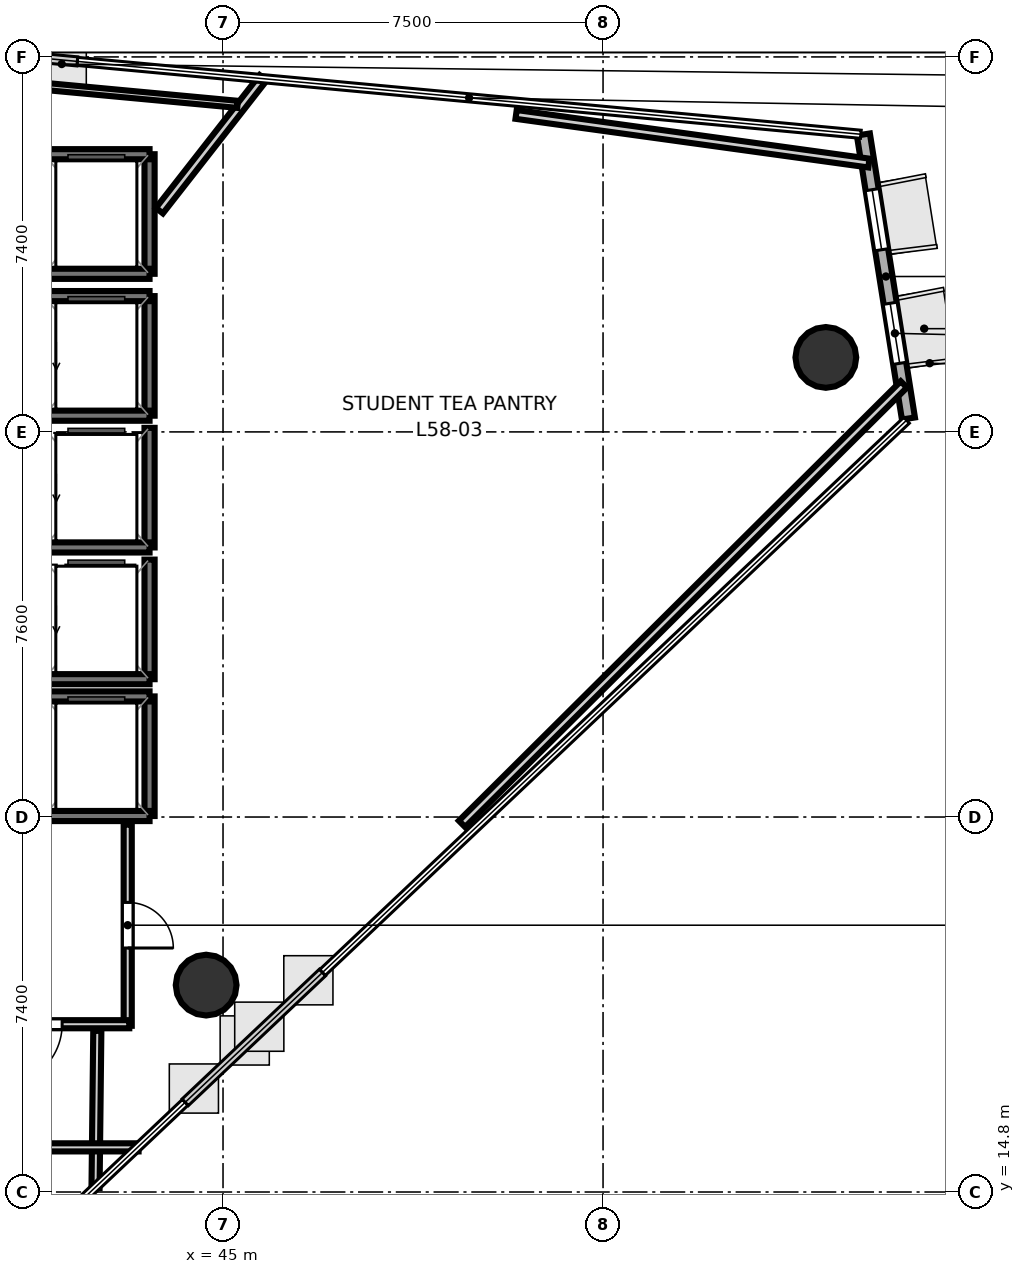
"""IFC4 building model, lengths in metres.
Left out: names, types, materials, properties, quantities, classifications, styles, units other than length and angle.
Written with IfcOpenShell. Run it as: python <this file> out.ifc"""

import sys

from ifc_helpers import new_model, si_unit, direction, frame, frame_2d, origin, origin_2d, place, context, subcontext, project, spatial, rectangle, hollow_circle, extrude, element, fill, save


model = new_model("IFC4")
c1 = context("Model", 3, precision=1e-05, world=origin(), true_north=direction((0.0, 1.0)))
c2 = subcontext(c1, "Body", "Model", "MODEL_VIEW")
j1 = project(units=[si_unit("LENGTHUNIT", "METRE"), si_unit("PLANEANGLEUNIT", "RADIAN")], contexts=[c1])
p1 = place(None, origin())
s1 = spatial("IfcSite", under=j1, at=p1, CompositionType="ELEMENT")
p2 = place(p1, origin())
s2 = spatial("IfcBuilding", under=s1, at=p2, CompositionType="ELEMENT")
p3 = place(p2, frame((0.0, 0.0, 226.2)))
s3 = spatial("IfcBuildingStorey", under=s2, at=p3, CompositionType="ELEMENT", Elevation=226.2)
for number, where, z_axis, x_axis in (
    (1, (56.897, 31.27, 0.0), (0.0, 0.0, 1.0), (1.0, 0.0, 0.0)),
    (2, (44.667, 18.883, 0.0), (0.0, 0.0, 1.0), (1.0, 0.0, 0.0)),
):
    element("IfcColumn", number, at=place(p3, frame(where, z_axis=z_axis, x_axis=x_axis)), inside=s3, PredefinedType="COLUMN", context=c2, shape_type="SweptSolid", body=[
        extrude(hollow_circle(Radius=0.6, WallThickness=0.03, at=origin_2d()), origin(), (0.0, 0.0, 1.0), 3.7),
    ])
p4 = place(p3, frame((58.527, 30.064, 0.0), z_axis=(0.0, 0.0, 1.0), x_axis=(-0.156726912171, 0.987641977136, 0.0)))
e3 = element("IfcWall", 3, at=p4, inside=s3, PredefinedType="SOLIDWALL", context=c2, shape_type="SweptSolid", body=[
    extrude(rectangle(XDim=5.675, YDim=0.26, at=frame_2d((2.837, 0.0))), origin(), (0.0, 0.0, 1.0), 3.4),
])
p5 = place(p4, frame((1.102, 0.0, 0.9)))
e4 = element("IfcOpeningElement", 4, at=p5, cuts=e3, PredefinedType="OPENING", context=c2, shape_type="SweptSolid", body=[
    extrude(rectangle(XDim=1.2, YDim=2.0, at=frame_2d((0.6, 1.0))), frame((0.0, 0.14, 0.0), z_axis=(0.0, -1.0, 0.0), x_axis=(1.0, 0.0, 0.0)), (0.0, 0.0, 1.0), 0.28),
])
p6 = place(p4, frame((3.372, 0.0, 0.9)))
e5 = element("IfcOpeningElement", 5, at=p6, cuts=e3, PredefinedType="OPENING", context=c2, shape_type="SweptSolid", body=[
    extrude(rectangle(XDim=1.2, YDim=2.0, at=frame_2d((0.6, 1.0))), frame((0.0, 0.14, 0.0), z_axis=(0.0, -1.0, 0.0), x_axis=(1.0, 0.0, 0.0)), (0.0, 0.0, 1.0), 0.28),
])
p7 = place(p3, frame((43.55, 30.12, 0.0), z_axis=(0.0, 0.0, 1.0), x_axis=(0.0, 1.0, 0.0)))
e6 = element("IfcWall", 6, at=p7, inside=s3, PredefinedType="SOLIDWALL", context=c2, shape_type="SweptSolid", body=[
    extrude(rectangle(XDim=2.36, YDim=0.2, at=frame_2d((1.18, 0.0))), origin(), (0.0, 0.0, 1.0), 3.4),
])
for number, where, z_axis, x_axis in (
    (7, (41.45, 32.48, 0.0), (0.0, 0.0, 1.0), (1.0, 0.0, 0.0)),
    (8, (41.45, 30.12, 0.0), (0.0, 0.0, 1.0), (1.0, 0.0, 0.0)),
):
    element("IfcWall", number, at=place(p3, frame(where, z_axis=z_axis, x_axis=x_axis)), inside=s3, PredefinedType="SOLIDWALL", context=c2, shape_type="SweptSolid", body=[
        extrude(rectangle(XDim=2.1, YDim=0.2, at=frame_2d((1.05, 0.0))), origin(), (0.0, 0.0, 1.0), 3.4),
    ])
p8 = place(p3, frame((43.55, 27.52, 0.0), z_axis=(0.0, 0.0, 1.0), x_axis=(0.0, 1.0, 0.0)))
e9 = element("IfcWall", 9, at=p8, inside=s3, PredefinedType="SOLIDWALL", context=c2, shape_type="SweptSolid", body=[
    extrude(rectangle(XDim=2.36, YDim=0.2, at=frame_2d((1.18, 0.0))), origin(), (0.0, 0.0, 1.0), 3.4),
])
p9 = place(p3, frame((41.45, 27.52, 0.0), z_axis=(0.0, 0.0, 1.0), x_axis=(1.0, 0.0, 0.0)))
e10 = element("IfcWall", 10, at=p9, inside=s3, PredefinedType="SOLIDWALL", context=c2, shape_type="SweptSolid", body=[
    extrude(rectangle(XDim=2.1, YDim=0.2, at=frame_2d((1.05, 0.0))), origin(), (0.0, 0.0, 1.0), 3.4),
])
p10 = place(p3, frame((43.55, 24.92, 0.0), z_axis=(0.0, 0.0, 1.0), x_axis=(0.0, 1.0, 0.0)))
e11 = element("IfcWall", 11, at=p10, inside=s3, PredefinedType="SOLIDWALL", context=c2, shape_type="SweptSolid", body=[
    extrude(rectangle(XDim=2.36, YDim=0.2, at=frame_2d((1.18, 0.0))), origin(), (0.0, 0.0, 1.0), 3.4),
])
p11 = place(p3, frame((41.45, 24.92, 0.0), z_axis=(0.0, 0.0, 1.0), x_axis=(1.0, 0.0, 0.0)))
e12 = element("IfcWall", 12, at=p11, inside=s3, PredefinedType="SOLIDWALL", context=c2, shape_type="SweptSolid", body=[
    extrude(rectangle(XDim=2.1, YDim=0.2, at=frame_2d((1.05, 0.0))), origin(), (0.0, 0.0, 1.0), 3.4),
])
p12 = place(p3, frame((43.55, 22.22, 0.0), z_axis=(0.0, 0.0, 1.0), x_axis=(0.0, 1.0, 0.0)))
e13 = element("IfcWall", 13, at=p12, inside=s3, PredefinedType="SOLIDWALL", context=c2, shape_type="SweptSolid", body=[
    extrude(rectangle(XDim=2.36, YDim=0.2, at=frame_2d((1.18, 0.0))), origin(), (0.0, 0.0, 1.0), 3.4),
])
for number, where, z_axis, x_axis in (
    (14, (41.45, 24.58, 0.0), (0.0, 0.0, 1.0), (1.0, 0.0, 0.0)),
    (15, (41.45, 22.22, 0.0), (0.0, 0.0, 1.0), (1.0, 0.0, 0.0)),
):
    element("IfcWall", number, at=place(p3, frame(where, z_axis=z_axis, x_axis=x_axis)), inside=s3, PredefinedType="SOLIDWALL", context=c2, shape_type="SweptSolid", body=[
        extrude(rectangle(XDim=2.1, YDim=0.2, at=frame_2d((1.05, 0.0))), origin(), (0.0, 0.0, 1.0), 3.4),
    ])
p13 = place(p3, frame((43.55, 32.92, 0.0), z_axis=(0.0, 0.0, 1.0), x_axis=(0.0, 1.0, 0.0)))
e16 = element("IfcWall", 16, at=p13, inside=s3, PredefinedType="SOLIDWALL", context=c2, shape_type="SweptSolid", body=[
    extrude(rectangle(XDim=2.36, YDim=0.2, at=frame_2d((1.18, 0.0))), origin(), (0.0, 0.0, 1.0), 3.4),
])
for number, where, z_axis, x_axis in (
    (17, (41.45, 35.28, 0.0), (0.0, 0.0, 1.0), (1.0, 0.0, 0.0)),
    (18, (41.45, 32.92, 0.0), (0.0, 0.0, 1.0), (1.0, 0.0, 0.0)),
):
    element("IfcWall", number, at=place(p3, frame(where, z_axis=z_axis, x_axis=x_axis)), inside=s3, PredefinedType="SOLIDWALL", context=c2, shape_type="SweptSolid", body=[
        extrude(rectangle(XDim=2.1, YDim=0.2, at=frame_2d((1.05, 0.0))), origin(), (0.0, 0.0, 1.0), 3.4),
    ])
p14 = place(p3, frame((43.119, 22.05, 0.0), z_axis=(0.0, 0.0, 1.0), x_axis=(0.0, -1.0, 0.0)))
e19 = element("IfcWall", 19, at=p14, inside=s3, PredefinedType="PARTITIONING", context=c2, shape_type="SweptSolid", body=[
    extrude(rectangle(XDim=3.97, YDim=0.16, at=frame_2d((1.985, 0.0))), origin(), (0.0, 0.0, 1.0), 2.72),
])
p15 = place(p14, frame((1.535, 0.0, 0.0)))
e20 = element("IfcOpeningElement", 20, at=p15, cuts=e19, PredefinedType="OPENING", context=c2, shape_type="SweptSolid", body=[
    extrude(rectangle(XDim=0.9, YDim=2.1, at=frame_2d((0.45, 1.05))), frame((0.0, 0.09, 0.0), z_axis=(0.0, -1.0, 0.0), x_axis=(1.0, 0.0, 0.0)), (0.0, 0.0, 1.0), 0.18),
])
p16 = place(p3, frame((43.15, 18.111, 0.0), z_axis=(0.0, 0.0, 1.0), x_axis=(-1.0, 0.0, 0.0)))
e21 = element("IfcWall", 21, at=p16, inside=s3, PredefinedType="PARTITIONING", context=c2, shape_type="SweptSolid", body=[
    extrude(rectangle(XDim=2.73, YDim=0.16, at=frame_2d((1.365, 0.0))), origin(), (0.0, 0.0, 1.0), 2.72),
])
p17 = place(p16, frame((1.325, 0.0, 0.0)))
e22 = element("IfcOpeningElement", 22, at=p17, cuts=e21, PredefinedType="OPENING", context=c2, shape_type="SweptSolid", body=[
    extrude(rectangle(XDim=1.2, YDim=2.15, at=frame_2d((0.6, 1.075))), frame((0.0, 0.09, 0.0), z_axis=(0.0, -1.0, 0.0), x_axis=(1.0, 0.0, 0.0)), (0.0, 0.0, 1.0), 0.18),
])
p18 = place(p3, frame((42.519, 17.98, 0.0), z_axis=(0.0, 0.0, 1.0), x_axis=(-0.011327152438, -0.999935845751, 0.0)))
e23 = element("IfcWall", 23, at=p18, inside=s3, PredefinedType="PARTITIONING", context=c2, shape_type="SweptSolid", body=[
    extrude(rectangle(XDim=3.104, YDim=0.16, at=frame_2d((1.552, 0.0))), origin(), (0.0, 0.0, 1.0), 2.72),
])
p19 = place(p3, frame((43.333, 15.681, 0.0), z_axis=(0.0, 0.0, 1.0), x_axis=(-1.0, 0.0, 0.0)))
e24 = element("IfcWall", 24, at=p19, inside=s3, PredefinedType="PARTITIONING", context=c2, shape_type="SweptSolid", body=[
    extrude(rectangle(XDim=14.933, YDim=0.16, at=frame_2d((7.467, 0.0))), origin(), (0.0, 0.0, 1.0), 2.72),
])
p20 = place(p19, frame((10.693, 0.0, 0.0)))
e25 = element("IfcOpeningElement", 25, at=p20, cuts=e24, PredefinedType="OPENING", context=c2, shape_type="SweptSolid", body=[
    extrude(rectangle(XDim=0.9, YDim=2.1, at=frame_2d((0.45, 1.05))), frame((0.0, 0.09, 0.0), z_axis=(0.0, -1.0, 0.0), x_axis=(1.0, 0.0, 0.0)), (0.0, 0.0, 1.0), 0.18),
])
p21 = place(p19, frame((4.002, 0.0, 0.0)))
e26 = element("IfcOpeningElement", 26, at=p21, cuts=e24, PredefinedType="OPENING", context=c2, shape_type="SweptSolid", body=[
    extrude(rectangle(XDim=0.9, YDim=2.1, at=frame_2d((0.45, 1.05))), frame((0.0, 0.09, 0.0), z_axis=(0.0, -1.0, 0.0), x_axis=(1.0, 0.0, 0.0)), (0.0, 0.0, 1.0), 0.18),
])
p22 = place(p3, frame((43.744, 34.166, 0.0), z_axis=(0.0, 0.0, 1.0), x_axis=(0.615631223484, 0.788034388001, 0.0)))
e27 = element("IfcWall", 27, at=p22, inside=s3, PredefinedType="PLUMBINGWALL", context=c2, shape_type="SweptSolid", body=[
    extrude(rectangle(XDim=3.326, YDim=0.175, at=frame_2d((1.663, 0.0))), origin(), (0.0, 0.0, 1.0), 2.72),
])
p23 = place(p3, frame((50.784, 36.065, 0.0), z_axis=(0.0, 0.0, 1.0), x_axis=(0.990633608962, -0.13654688863, 0.0)))
e28 = element("IfcWall", 28, at=p23, inside=s3, PredefinedType="PLUMBINGWALL", context=c2, shape_type="SweptSolid", body=[
    extrude(rectangle(XDim=7.029, YDim=0.175, at=frame_2d((3.514, 0.0))), origin(), (0.0, 0.0, 1.0), 2.72),
])
p24 = place(p3, frame((58.437, 30.737, 0.0), z_axis=(0.0, 0.0, 1.0), x_axis=(-0.709059350693, -0.705148805002, 0.0)))
e29 = element("IfcWall", 29, at=p24, inside=s3, PredefinedType="PLUMBINGWALL", context=c2, shape_type="SweptSolid", body=[
    extrude(rectangle(XDim=12.299, YDim=0.175, at=frame_2d((6.149, 0.0))), origin(), (0.0, 0.0, 1.0), 2.72),
])
p25 = place(p3, frame((39.062, 36.843, 0.0), z_axis=(0.0, 0.0, 1.0), x_axis=(0.995704481779, -0.092588255012, 0.0)))
e30 = element("IfcWall", 30, at=p25, inside=s3, PredefinedType="PARTITIONING", context=c2, shape_type="SweptSolid", body=[
    extrude(rectangle(XDim=6.252, YDim=0.14, at=frame_2d((3.126, 0.0))), origin(), (0.0, 0.0, 1.0), 2.72),
])
p26 = place(p17, origin())
e31 = element("IfcDoor", 31, at=p26, inside=s3, OperationType="SINGLE_SWING_RIGHT", PredefinedType="DOOR", context=c2, shape_type="SweptSolid", body=[
    extrude(rectangle(XDim=1.2, YDim=2.15, at=frame_2d((0.6, 1.075))), frame((0.0, 0.025, 0.0), z_axis=(0.0, -1.0, 0.0), x_axis=(1.0, 0.0, 0.0)), (0.0, 0.0, 1.0), 0.05),
])
fill(e22, e31)
p27 = place(p15, origin())
e32 = element("IfcDoor", 32, at=p27, inside=s3, OperationType="SINGLE_SWING_RIGHT", PredefinedType="DOOR", context=c2, shape_type="SweptSolid", body=[
    extrude(rectangle(XDim=0.9, YDim=2.1, at=frame_2d((0.45, 1.05))), frame((0.0, 0.025, 0.0), z_axis=(0.0, -1.0, 0.0), x_axis=(1.0, 0.0, 0.0)), (0.0, 0.0, 1.0), 0.05),
])
fill(e20, e32)
p28 = place(p5, origin())
e33 = element("IfcWindow", 33, at=p28, inside=s3, PartitioningType="SINGLE_PANEL", PredefinedType="WINDOW", context=c2, shape_type="SweptSolid", body=[
    extrude(rectangle(XDim=1.2, YDim=2.0, at=frame_2d((0.6, 1.0))), frame((0.0, 0.03, 0.0), z_axis=(0.0, -1.0, 0.0), x_axis=(1.0, 0.0, 0.0)), (0.0, 0.0, 1.0), 0.06),
])
fill(e4, e33)
p29 = place(p6, origin())
e34 = element("IfcWindow", 34, at=p29, inside=s3, PartitioningType="SINGLE_PANEL", PredefinedType="WINDOW", context=c2, shape_type="SweptSolid", body=[
    extrude(rectangle(XDim=1.2, YDim=2.0, at=frame_2d((0.6, 1.0))), frame((0.0, 0.03, 0.0), z_axis=(0.0, -1.0, 0.0), x_axis=(1.0, 0.0, 0.0)), (0.0, 0.0, 1.0), 0.06),
])
fill(e5, e34)
save(model, sys.argv[1])
